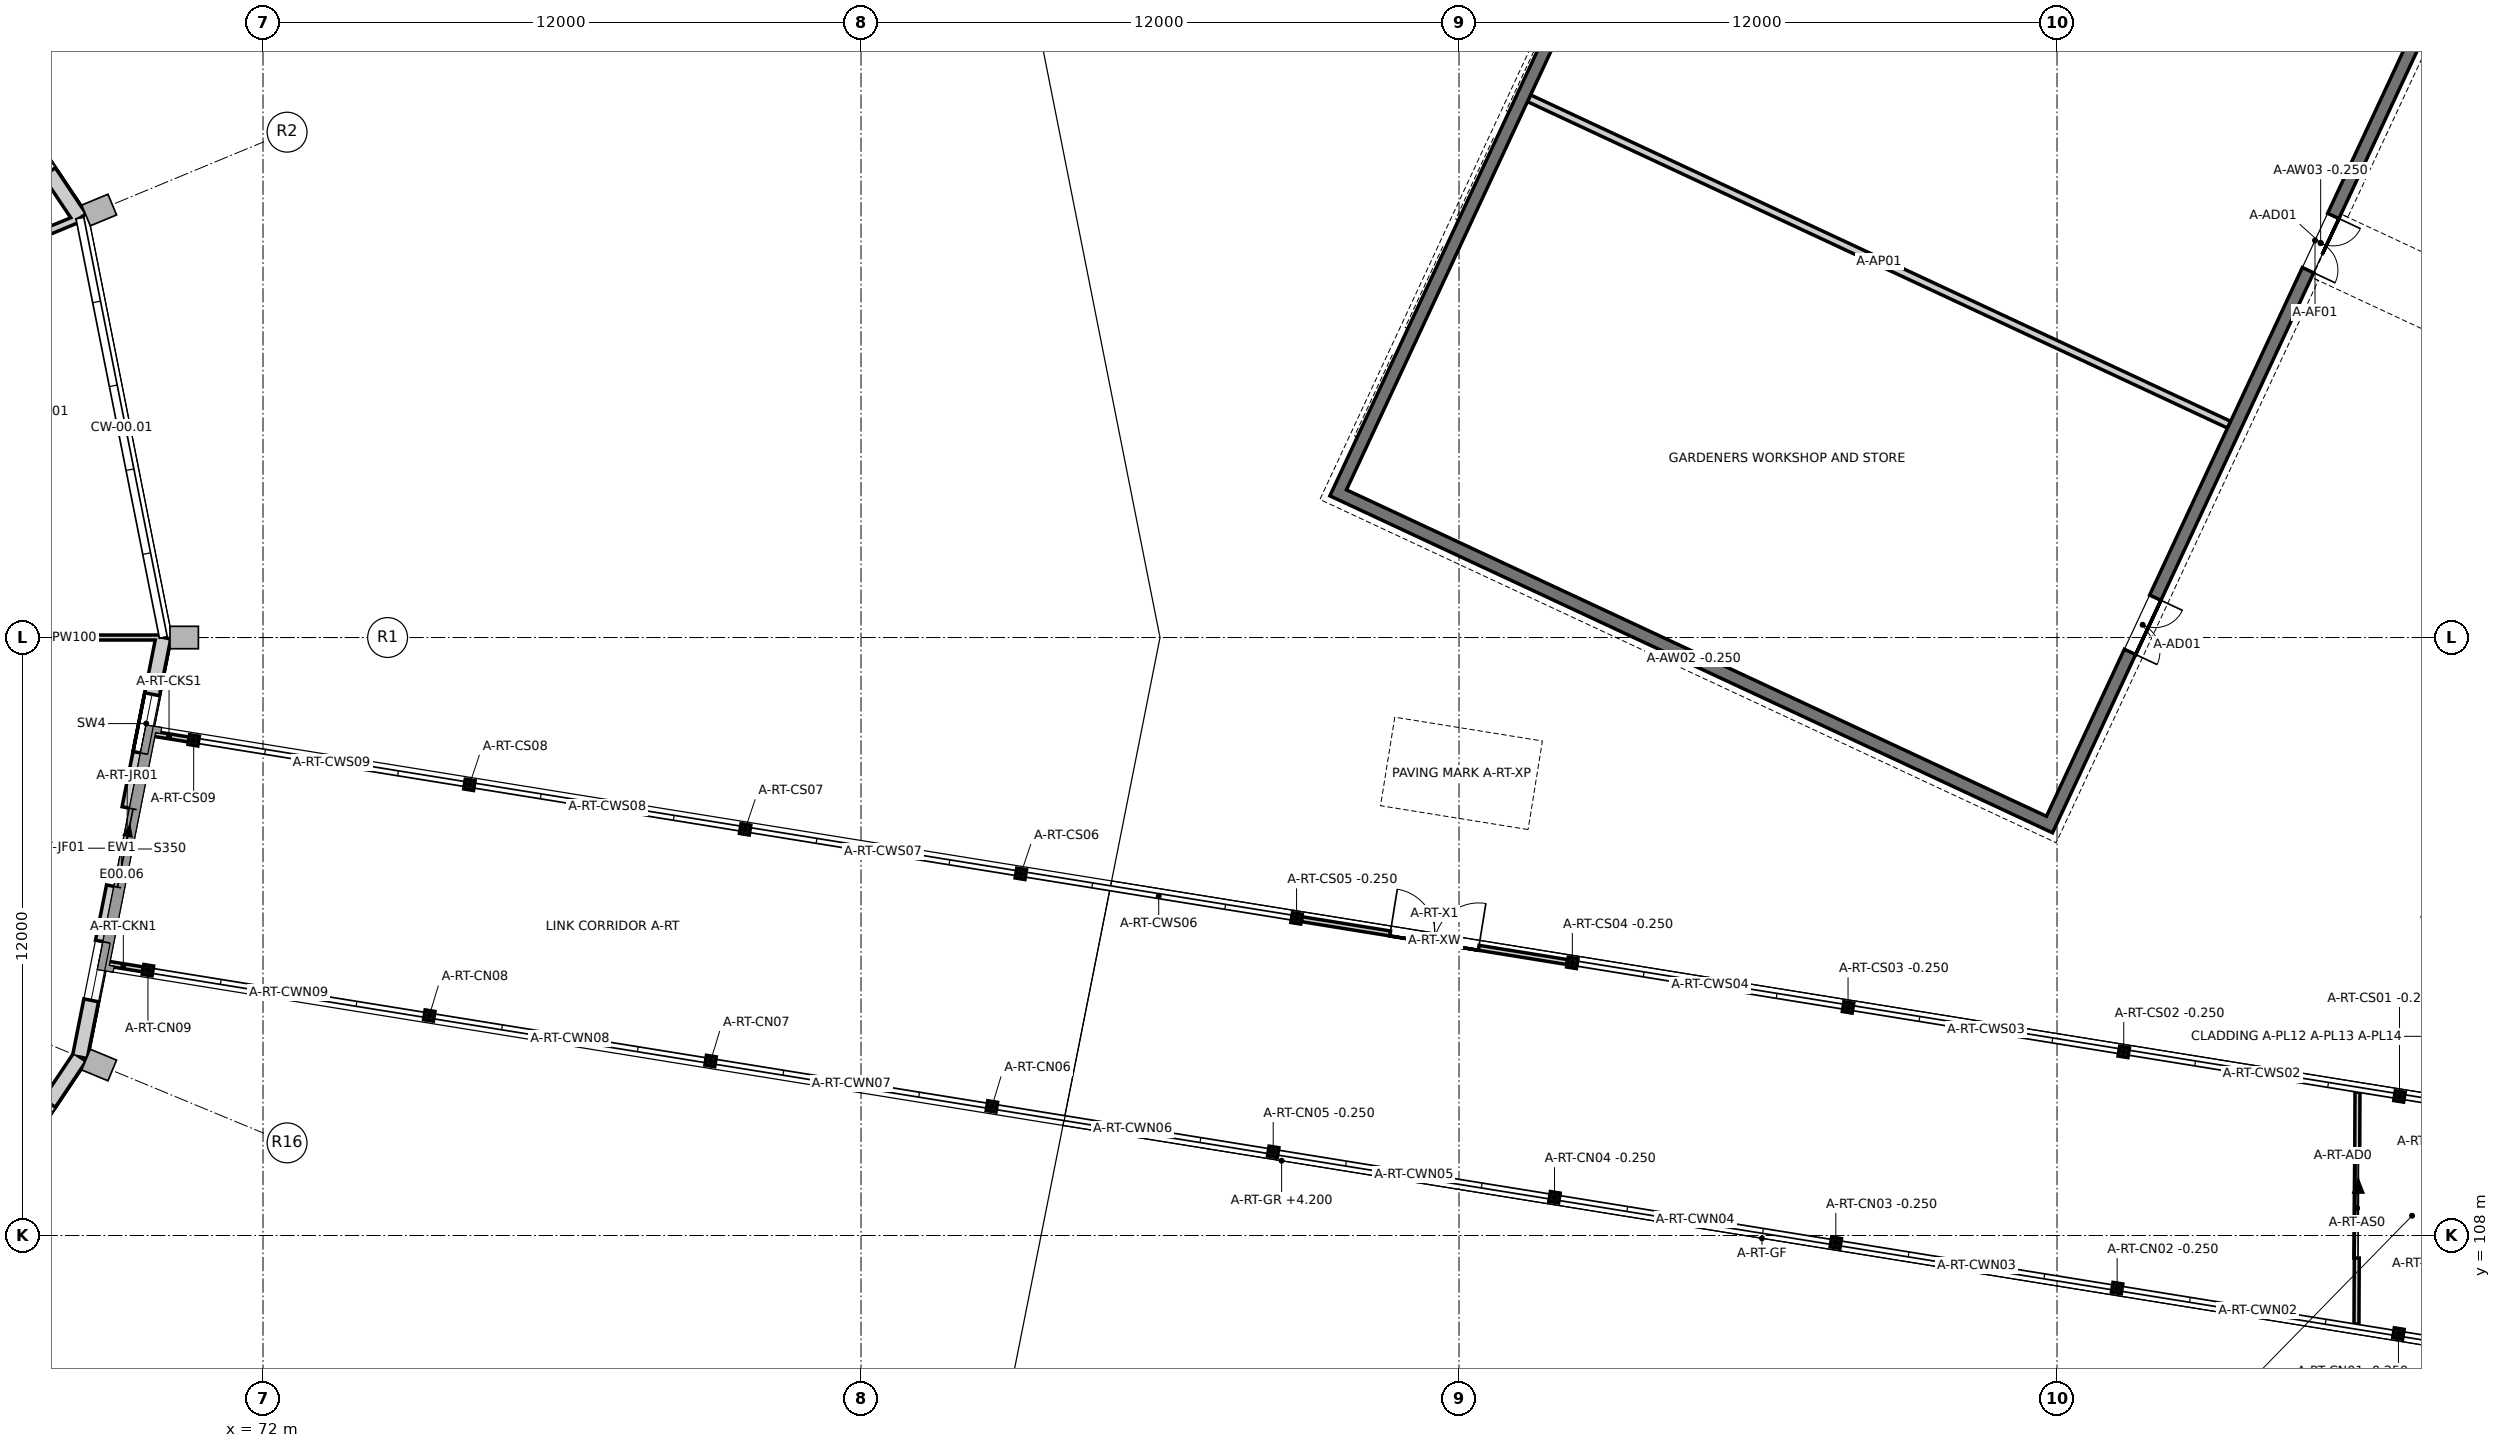
"""IFC4 building model, lengths in metres.
Left out: names, types, materials, properties, quantities, classifications, styles, units other than length and angle.
Written with IfcOpenShell. Run it as: python <this file> out.ifc"""

import sys

from ifc_helpers import new_model, si_unit, direction, frame, frame_2d, origin, origin_2d, place, context, subcontext, project, spatial, polyline, rectangle, hollow_rectangle, outline, extrude, element, fill, save


model = new_model("IFC4")
c1 = context("Model", 3, precision=1e-05, world=origin(), true_north=direction((0.0, 1.0)))
c2 = subcontext(c1, "Body", "Model", "MODEL_VIEW")
j1 = project(units=[si_unit("LENGTHUNIT", "METRE"), si_unit("PLANEANGLEUNIT", "RADIAN")], contexts=[c1])
p1 = place(None, origin())
s1 = spatial("IfcSite", under=j1, at=p1, CompositionType="ELEMENT")
p2 = place(p1, origin())
s2 = spatial("IfcBuilding", under=s1, at=p2, CompositionType="ELEMENT")
p3 = place(p2, origin())
s3 = spatial("IfcBuildingStorey", under=s2, at=p3, CompositionType="ELEMENT", Elevation=0.0)
p4 = place(p3, frame((104.51, 146.354, -0.25), z_axis=(0.0, 0.0, 1.0), x_axis=(-0.42261762504, -0.906308083935, 0.0)))
e1 = element("IfcWall", 1, at=p4, inside=s3, PredefinedType="SOLIDWALL", context=c2, shape_type="SweptSolid", body=[
    extrude(rectangle(XDim=26.0, YDim=0.25, at=frame_2d((13.0, 0.0))), origin(), (0.0, 0.0, 1.0), 3.25),
])
p5 = place(p3, frame((93.461, 122.956, -0.25), z_axis=(0.0, 0.0, 1.0), x_axis=(0.906306674627, -0.422620647302, 0.0)))
e2 = element("IfcWall", 2, at=p5, inside=s3, PredefinedType="SOLIDWALL", context=c2, shape_type="SweptSolid", body=[
    extrude(rectangle(XDim=16.0, YDim=0.25, at=frame_2d((8.0, 0.0))), origin(), (0.0, 0.0, 1.0), 3.25),
])
p6 = place(p3, frame((107.796, 116.134, -0.25), z_axis=(0.0, 0.0, 1.0), x_axis=(0.422614028477, 0.906309761028, 0.0)))
e3 = element("IfcWall", 3, at=p6, inside=s3, PredefinedType="SOLIDWALL", context=c2, shape_type="SweptSolid", body=[
    extrude(rectangle(XDim=26.0, YDim=0.25, at=frame_2d((13.0, 0.0))), origin(), (0.0, 0.0, 1.0), 3.25),
])
p7 = place(p6, frame((12.4, 0.0, 0.25)))
e4 = element("IfcOpeningElement", 4, at=p7, cuts=e3, PredefinedType="OPENING", context=c2, shape_type="SweptSolid", body=[
    extrude(rectangle(XDim=1.2, YDim=2.1, at=frame_2d((0.6, 1.05))), frame((0.0, 0.135, 0.0), z_axis=(0.0, -1.0, 0.0), x_axis=(1.0, 0.0, 0.0)), (0.0, 0.0, 1.0), 0.27),
])
p8 = place(p6, frame((3.948, 0.0, 0.25)))
e5 = element("IfcOpeningElement", 5, at=p8, cuts=e3, PredefinedType="OPENING", context=c2, shape_type="SweptSolid", body=[
    extrude(rectangle(XDim=1.2, YDim=2.1, at=frame_2d((0.6, 1.05))), frame((0.0, 0.135, 0.0), z_axis=(0.0, -1.0, 0.0), x_axis=(1.0, 0.0, 0.0)), (0.0, 0.0, 1.0), 0.27),
])
for number, where, z_axis, x_axis in (
    (6, (114.851, 106.033, -0.25), (0.0, 0.0, 1.0), (-0.987, 0.159, 0.0)),
    (7, (114.872, 110.791, -0.25), (0.0, 0.0, 1.0), (-0.987, 0.159, 0.0)),
    (8, (109.206, 106.945, -0.25), (0.0, 0.0, 1.0), (-0.987, 0.159, 0.0)),
    (9, (109.339, 111.684, -0.25), (0.0, 0.0, 1.0), (-0.987, 0.159, 0.0)),
    (10, (103.561, 107.856, -0.25), (0.0, 0.0, 1.0), (-0.987, 0.159, 0.0)),
    (11, (103.806, 112.578, -0.25), (0.0, 0.0, 1.0), (-0.987, 0.159, 0.0)),
    (12, (97.916, 108.768, -0.25), (0.0, 0.0, 1.0), (-0.987, 0.159, 0.0)),
    (13, (98.273, 113.471, -0.25), (0.0, 0.0, 1.0), (-0.987, 0.159, 0.0)),
    (14, (92.271, 109.679, -0.25), (0.0, 0.0, 1.0), (-0.987, 0.159, 0.0)),
    (15, (92.74, 114.364, -0.25), (0.0, 0.0, 1.0), (-0.987, 0.159, 0.0)),
):
    element("IfcColumn", number, at=place(p3, frame(where, z_axis=z_axis, x_axis=x_axis)), inside=s3, PredefinedType="COLUMN", context=c2, shape_type="SweptSolid", body=[
        extrude(hollow_rectangle(XDim=0.2, YDim=0.2, WallThickness=0.01, at=origin_2d()), origin(), (0.0, 0.0, 1.0), 4.05),
    ])
for number, where, z_axis, x_axis in (
    (16, (86.626, 110.591, 0.0), (0.0, 0.0, 1.0), (-0.987, 0.159, 0.0)),
    (17, (87.208, 115.258, 0.0), (0.0, 0.0, 1.0), (-0.987, 0.159, 0.0)),
    (18, (80.981, 111.502, 0.0), (0.0, 0.0, 1.0), (-0.987, 0.159, 0.0)),
    (19, (81.675, 116.151, 0.0), (0.0, 0.0, 1.0), (-0.987, 0.159, 0.0)),
    (20, (75.336, 112.413, 0.0), (0.0, 0.0, 1.0), (-0.987, 0.159, 0.0)),
    (21, (76.142, 117.044, 0.0), (0.0, 0.0, 1.0), (-0.987, 0.159, 0.0)),
    (22, (69.691, 113.325, 0.0), (0.0, 0.0, 1.0), (-0.987, 0.159, 0.0)),
    (23, (70.609, 117.938, 0.0), (0.0, 0.0, 1.0), (-0.987, 0.159, 0.0)),
):
    element("IfcColumn", number, at=place(p3, frame(where, z_axis=z_axis, x_axis=x_axis)), inside=s3, PredefinedType="COLUMN", context=c2, shape_type="SweptSolid", body=[
        extrude(hollow_rectangle(XDim=0.2, YDim=0.2, WallThickness=0.01, at=origin_2d()), origin(), (0.0, 0.0, 1.0), 3.8),
    ])
p9 = place(p3, frame((69.59, 113.341, 0.0), z_axis=(0.0, 0.0, 1.0), x_axis=(-0.987208512097, 0.15943448072, 0.0)))
e24 = element("IfcWall", 24, at=p9, inside=s3, PredefinedType="PARTITIONING", context=c2, shape_type="SweptSolid", body=[
    extrude(rectangle(XDim=0.798, YDim=0.1, at=frame_2d((0.399, 0.0))), origin(), (0.0, 0.0, 1.0), 3.8),
])
p10 = place(p3, frame((70.508, 117.954, 0.0), z_axis=(0.0, 0.0, 1.0), x_axis=(-0.98721628731, 0.159386329621, 0.0)))
e25 = element("IfcWall", 25, at=p10, inside=s3, PredefinedType="PARTITIONING", context=c2, shape_type="SweptSolid", body=[
    extrude(rectangle(XDim=0.798, YDim=0.1, at=frame_2d((0.399, 0.0))), origin(), (0.0, 0.0, 1.0), 3.8),
])
p11 = place(p3, frame((114.009, 106.22, 0.0), z_axis=(0.0, 0.0, 1.0), x_axis=(0.00435188832, 0.999990530489, 0.0)))
e26 = element("IfcWall", 26, at=p11, inside=s3, PredefinedType="PARTITIONING", context=c2, shape_type="SweptSolid", body=[
    extrude(rectangle(XDim=4.656, YDim=0.1, at=frame_2d((2.328, 0.0))), origin(), (0.0, 0.0, 1.0), 3.8),
])
p12 = place(p11, frame((1.328, 0.0, 0.0)))
e27 = element("IfcOpeningElement", 27, at=p12, cuts=e26, PredefinedType="OPENING", context=c2, shape_type="SweptSolid", body=[
    extrude(rectangle(XDim=2.0, YDim=2.4, at=frame_2d((1.0, 1.2))), frame((0.0, 0.06, 0.0), z_axis=(0.0, -1.0, 0.0), x_axis=(1.0, 0.0, 0.0)), (0.0, 0.0, 1.0), 0.12),
])
p13 = place(p3, frame((68.325, 128.419, 0.0), z_axis=(0.0, 0.0, 1.0), x_axis=(-0.555566251771, 0.831472272474, 0.0)))
e28 = element("IfcWall", 28, at=p13, inside=s3, PredefinedType="SOLIDWALL", context=c2, shape_type="SweptSolid", body=[
    extrude(outline(polyline([(-0.03, -0.15), (8.614, -0.15), (8.554, 0.15), (0.03, 0.15), (-0.03, -0.15)])), origin(), (0.0, 0.0, 1.0), 4.9),
])
p14 = place(p13, frame((3.392, 0.0, 0.0)))
e29 = element("IfcOpeningElement", 29, at=p14, cuts=e28, PredefinedType="OPENING", context=c2, shape_type="SweptSolid", body=[
    extrude(rectangle(XDim=1.8, YDim=2.1, at=frame_2d((0.9, 1.05))), frame((0.0, 0.16, 0.0), z_axis=(0.0, -1.0, 0.0), x_axis=(1.0, 0.0, 0.0)), (0.0, 0.0, 1.0), 0.32),
])
p15 = place(p13, frame((1.111, 0.0, 0.2)))
e30 = element("IfcOpeningElement", 30, at=p15, cuts=e28, PredefinedType="OPENING", context=c2, shape_type="SweptSolid", body=[
    extrude(rectangle(XDim=1.2, YDim=3.2, at=frame_2d((0.6, 1.6))), frame((0.0, 0.16, 0.0), z_axis=(0.0, -1.0, 0.0), x_axis=(1.0, 0.0, 0.0)), (0.0, 0.0, 1.0), 0.32),
])
p16 = place(p13, frame((6.273, 0.0, 0.2)))
e31 = element("IfcOpeningElement", 31, at=p16, cuts=e28, PredefinedType="OPENING", context=c2, shape_type="SweptSolid", body=[
    extrude(rectangle(XDim=1.2, YDim=3.2, at=frame_2d((0.6, 1.6))), frame((0.0, 0.16, 0.0), z_axis=(0.0, -1.0, 0.0), x_axis=(1.0, 0.0, 0.0)), (0.0, 0.0, 1.0), 0.32),
])
p17 = place(p3, frame((63.556, 104.444, 0.0), z_axis=(0.0, 0.0, 1.0), x_axis=(0.555566251771, 0.831472272474, 0.0)))
e32 = element("IfcWall", 32, at=p17, inside=s3, PredefinedType="SOLIDWALL", context=c2, shape_type="SweptSolid", body=[
    extrude(outline(polyline([(-0.03, -0.15), (8.614, -0.15), (8.554, 0.15), (0.03, 0.15), (-0.03, -0.15)])), origin(), (0.0, 0.0, 1.0), 4.9),
])
p18 = place(p17, frame((3.392, 0.0, 0.0)))
e33 = element("IfcOpeningElement", 33, at=p18, cuts=e32, PredefinedType="OPENING", context=c2, shape_type="SweptSolid", body=[
    extrude(rectangle(XDim=1.8, YDim=2.1, at=frame_2d((0.9, 1.05))), frame((0.0, 0.16, 0.0), z_axis=(0.0, -1.0, 0.0), x_axis=(1.0, 0.0, 0.0)), (0.0, 0.0, 1.0), 0.32),
])
p19 = place(p17, frame((1.111, 0.0, 0.2)))
e34 = element("IfcOpeningElement", 34, at=p19, cuts=e32, PredefinedType="OPENING", context=c2, shape_type="SweptSolid", body=[
    extrude(rectangle(XDim=1.2, YDim=3.2, at=frame_2d((0.6, 1.6))), frame((0.0, 0.16, 0.0), z_axis=(0.0, -1.0, 0.0), x_axis=(1.0, 0.0, 0.0)), (0.0, 0.0, 1.0), 0.32),
])
p20 = place(p17, frame((6.273, 0.0, 0.2)))
e35 = element("IfcOpeningElement", 35, at=p20, cuts=e32, PredefinedType="OPENING", context=c2, shape_type="SweptSolid", body=[
    extrude(rectangle(XDim=1.2, YDim=3.2, at=frame_2d((0.6, 1.6))), frame((0.0, 0.16, 0.0), z_axis=(0.0, -1.0, 0.0), x_axis=(1.0, 0.0, 0.0)), (0.0, 0.0, 1.0), 0.32),
])
p21 = place(p3, frame((68.325, 111.581, 0.0), z_axis=(0.0, 0.0, 1.0), x_axis=(0.195082276278, 0.980786880766, 0.0)))
e36 = element("IfcWall", 36, at=p21, inside=s3, PredefinedType="SOLIDWALL", context=c2, shape_type="SweptSolid", body=[
    extrude(outline(polyline([(-0.03, -0.15), (8.614, -0.15), (8.554, 0.15), (0.03, 0.15), (-0.03, -0.15)])), origin(), (0.0, 0.0, 1.0), 4.9),
])
p22 = place(p21, frame((3.492, 0.0, 0.0)))
e37 = element("IfcOpeningElement", 37, at=p22, cuts=e36, PredefinedType="OPENING", context=c2, shape_type="SweptSolid", body=[
    extrude(rectangle(XDim=1.6, YDim=2.4, at=frame_2d((0.8, 1.2))), frame((0.0, 0.16, 0.0), z_axis=(0.0, -1.0, 0.0), x_axis=(1.0, 0.0, 0.0)), (0.0, 0.0, 1.0), 0.32),
])
p23 = place(p21, frame((1.161, 0.0, 0.2)))
e38 = element("IfcOpeningElement", 38, at=p23, cuts=e36, PredefinedType="OPENING", context=c2, shape_type="SweptSolid", body=[
    extrude(rectangle(XDim=1.2, YDim=3.2, at=frame_2d((0.6, 1.6))), frame((0.0, 0.16, 0.0), z_axis=(0.0, -1.0, 0.0), x_axis=(1.0, 0.0, 0.0)), (0.0, 0.0, 1.0), 0.32),
])
p24 = place(p21, frame((6.223, 0.0, 0.2)))
e39 = element("IfcOpeningElement", 39, at=p24, cuts=e36, PredefinedType="OPENING", context=c2, shape_type="SweptSolid", body=[
    extrude(rectangle(XDim=1.2, YDim=3.2, at=frame_2d((0.6, 1.6))), frame((0.0, 0.16, 0.0), z_axis=(0.0, -1.0, 0.0), x_axis=(1.0, 0.0, 0.0)), (0.0, 0.0, 1.0), 0.32),
])
p25 = place(p3, frame((66.49, 120.0, 0.0), z_axis=(0.0, 0.0, 1.0), x_axis=(1.0, 0.0, 0.0)))
e40 = element("IfcWall", 40, at=p25, inside=s3, PredefinedType="PARTITIONING", context=c2, shape_type="SweptSolid", body=[
    extrude(rectangle(XDim=3.448, YDim=0.1, at=frame_2d((1.724, 0.0))), origin(), (0.0, 0.0, 1.0), 4.9),
])
p26 = place(p3, frame((65.083, 127.076, 0.0), z_axis=(0.0, 0.0, 1.0), x_axis=(0.923891721509, 0.382654004196, 0.0)))
e41 = element("IfcWall", 41, at=p26, inside=s3, PredefinedType="PARTITIONING", context=c2, shape_type="SweptSolid", body=[
    extrude(rectangle(XDim=3.448, YDim=0.15, at=frame_2d((1.724, 0.0))), origin(), (0.0, 0.0, 1.0), 4.9),
])
p27 = place(p3, frame((98.17, 113.488, 0.0), z_axis=(0.0, 0.0, 1.0), x_axis=(-0.987215404619, 0.159391796785, 0.0)))
e42 = element("IfcWall", 42, at=p27, inside=s3, PredefinedType="PARTITIONING", context=c2, shape_type="SweptSolid", body=[
    extrude(rectangle(XDim=5.395, YDim=0.1, at=frame_2d((2.697, 0.0))), origin(), (0.0, 0.0, 1.0), 3.8),
])
p28 = place(p27, frame((1.797, 0.0, 0.0)))
e43 = element("IfcOpeningElement", 43, at=p28, cuts=e42, PredefinedType="OPENING", context=c2, shape_type="SweptSolid", body=[
    extrude(rectangle(XDim=1.8, YDim=2.4, at=frame_2d((0.9, 1.2))), frame((0.0, 0.06, 0.0), z_axis=(0.0, -1.0, 0.0), x_axis=(1.0, 0.0, 0.0)), (0.0, 0.0, 1.0), 0.12),
])
p29 = place(p3, frame((111.453, 124.271, 0.0), z_axis=(0.0, 0.0, 1.0), x_axis=(-0.906309854223, 0.422613828617, 0.0)))
e44 = element("IfcWall", 44, at=p29, inside=s3, PredefinedType="PARTITIONING", context=c2, shape_type="SweptSolid", body=[
    extrude(rectangle(XDim=15.5, YDim=0.15, at=frame_2d((7.75, 0.0))), origin(), (0.0, 0.0, 1.0), 3.0),
])
p30 = place(p7, frame((1.2, 0.0, 0.0), z_axis=(0.0, 0.0, 1.0), x_axis=(-1.0, 0.0, 0.0)))
e45 = element("IfcDoor", 45, at=p30, inside=s3, OperationType="DOUBLE_DOOR_SINGLE_SWING", PredefinedType="DOOR", context=c2, shape_type="SweptSolid", body=[
    extrude(rectangle(XDim=1.2, YDim=2.1, at=frame_2d((0.6, 1.05))), frame((0.0, 0.025, 0.0), z_axis=(0.0, -1.0, 0.0), x_axis=(1.0, 0.0, 0.0)), (0.0, 0.0, 1.0), 0.05),
])
fill(e4, e45)
p31 = place(p12, origin())
e46 = element("IfcDoor", 46, at=p31, inside=s3, OperationType="DOUBLE_DOOR_SLIDING", PredefinedType="DOOR", context=c2, shape_type="SweptSolid", body=[
    extrude(rectangle(XDim=2.0, YDim=2.4, at=frame_2d((1.0, 1.2))), frame((0.0, 0.025, 0.0), z_axis=(0.0, -1.0, 0.0), x_axis=(1.0, 0.0, 0.0)), (0.0, 0.0, 1.0), 0.05),
])
fill(e27, e46)
p32 = place(p22, origin())
e47 = element("IfcDoor", 47, at=p32, inside=s3, OperationType="DOUBLE_DOOR_DOUBLE_SWING", PredefinedType="DOOR", context=c2, shape_type="SweptSolid", body=[
    extrude(rectangle(XDim=1.6, YDim=2.4, at=frame_2d((0.8, 1.2))), frame((0.0, 0.025, 0.0), z_axis=(0.0, -1.0, 0.0), x_axis=(1.0, 0.0, 0.0)), (0.0, 0.0, 1.0), 0.05),
])
fill(e37, e47)
p33 = place(p23, origin())
e48 = element("IfcWindow", 48, at=p33, inside=s3, PartitioningType="SINGLE_PANEL", PredefinedType="WINDOW", context=c2, shape_type="SweptSolid", body=[
    extrude(rectangle(XDim=1.2, YDim=3.2, at=frame_2d((0.6, 1.6))), frame((0.0, 0.03, 0.0), z_axis=(0.0, -1.0, 0.0), x_axis=(1.0, 0.0, 0.0)), (0.0, 0.0, 1.0), 0.06),
])
fill(e38, e48)
p34 = place(p24, origin())
e49 = element("IfcWindow", 49, at=p34, inside=s3, PartitioningType="SINGLE_PANEL", PredefinedType="WINDOW", context=c2, shape_type="SweptSolid", body=[
    extrude(rectangle(XDim=1.2, YDim=3.2, at=frame_2d((0.6, 1.6))), frame((0.0, 0.03, 0.0), z_axis=(0.0, -1.0, 0.0), x_axis=(1.0, 0.0, 0.0)), (0.0, 0.0, 1.0), 0.06),
])
fill(e39, e49)
p35 = place(p28, frame((1.8, 0.0, 0.0), z_axis=(0.0, 0.0, 1.0), x_axis=(-1.0, 0.0, 0.0)))
e50 = element("IfcDoor", 50, at=p35, inside=s3, OperationType="DOUBLE_DOOR_SINGLE_SWING", PredefinedType="DOOR", context=c2, shape_type="SweptSolid", body=[
    extrude(rectangle(XDim=1.8, YDim=2.4, at=frame_2d((0.9, 1.2))), frame((0.0, 0.025, 0.0), z_axis=(0.0, -1.0, 0.0), x_axis=(1.0, 0.0, 0.0)), (0.0, 0.0, 1.0), 0.05),
])
fill(e43, e50)
p36 = place(p8, frame((1.2, 0.0, 0.0), z_axis=(0.0, 0.0, 1.0), x_axis=(-1.0, 0.0, 0.0)))
e51 = element("IfcDoor", 51, at=p36, inside=s3, OperationType="DOUBLE_DOOR_SINGLE_SWING", PredefinedType="DOOR", context=c2, shape_type="SweptSolid", body=[
    extrude(rectangle(XDim=1.2, YDim=2.1, at=frame_2d((0.6, 1.05))), frame((0.0, 0.025, 0.0), z_axis=(0.0, -1.0, 0.0), x_axis=(1.0, 0.0, 0.0)), (0.0, 0.0, 1.0), 0.05),
])
fill(e5, e51)
save(model, sys.argv[1])
